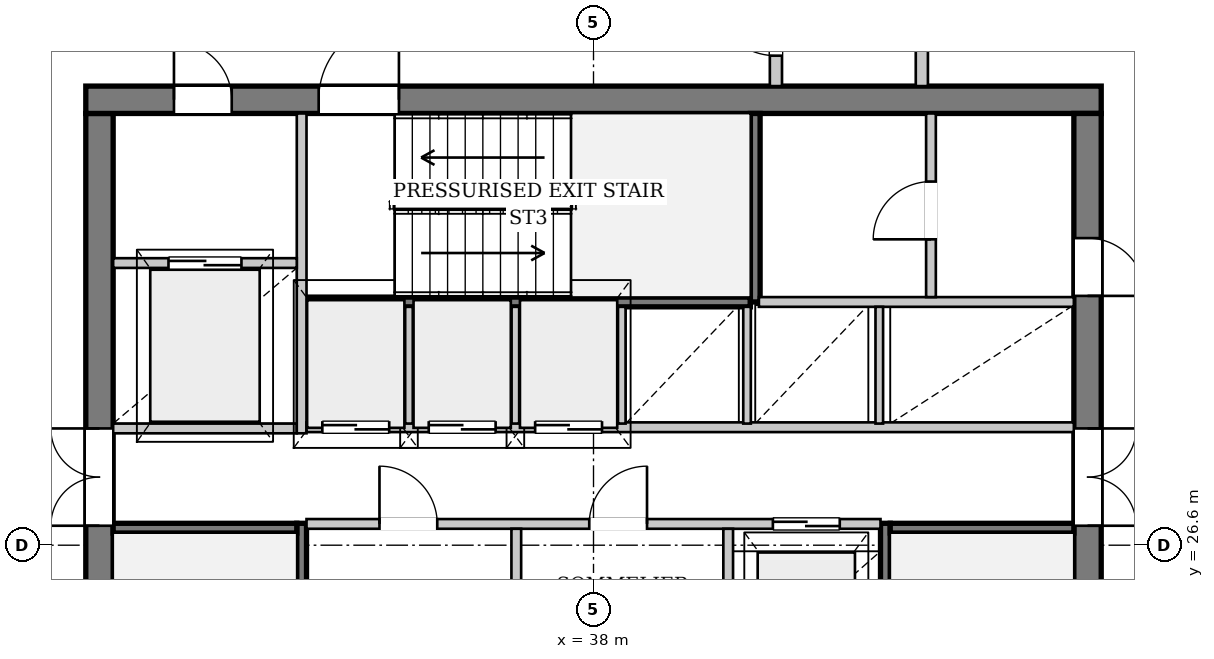
"""IFC4 building model, lengths in metres.
Left out: names, types, materials, properties, quantities, classifications, styles, units other than length and angle.
Written with IfcOpenShell. Run it as: python <this file> out.ifc"""

import sys

from ifc_helpers import new_model, si_unit, direction, frame, frame_2d, origin, place, context, subcontext, project, spatial, rectangle, extrude, source, transform, mapped, element, fill, save


model = new_model("IFC4")
c1 = context("Model", 3, precision=1e-05, world=origin(), true_north=direction((0.0, 1.0)))
c2 = subcontext(c1, "Body", "Model", "MODEL_VIEW")
j1 = project(units=[si_unit("LENGTHUNIT", "METRE"), si_unit("PLANEANGLEUNIT", "RADIAN")], contexts=[c1])
p1 = place(None, origin())
s1 = spatial("IfcSite", under=j1, at=p1, CompositionType="ELEMENT")
p2 = place(p1, origin())
s2 = spatial("IfcBuilding", under=s1, at=p2, CompositionType="ELEMENT")
p3 = place(p2, frame((0.0, 0.0, 259.7)))
s3 = spatial("IfcBuildingStorey", under=s2, at=p3, CompositionType="ELEMENT", Elevation=259.7)
p4 = place(p3, frame((51.72, 26.618, 0.0), z_axis=(0.0, 0.0, 1.0), x_axis=(-0.270053350252, -0.962845360386, 0.0)))
e1 = element("IfcWall", 1, at=p4, inside=s3, PredefinedType="SOLIDWALL", context=c2, shape_type="SweptSolid", body=[
    extrude(rectangle(XDim=22.391, YDim=0.32, at=frame_2d((11.195, 0.0))), origin(), (0.0, 0.0, 1.0), 2.872),
])
p5 = place(p4, frame((6.415, 0.0, 0.0)))
e2 = element("IfcOpeningElement", 2, at=p5, cuts=e1, PredefinedType="OPENING", context=c2, shape_type="SweptSolid", body=[
    extrude(rectangle(XDim=1.5, YDim=2.3, at=frame_2d((0.75, 1.15))), frame((0.0, 0.17, 0.0), z_axis=(0.0, -1.0, 0.0), x_axis=(1.0, 0.0, 0.0)), (0.0, 0.0, 1.0), 0.34),
])
p6 = place(p4, frame((15.269, 0.0, 0.402)))
e3 = element("IfcOpeningElement", 3, at=p6, cuts=e1, PredefinedType="OPENING", context=c2, shape_type="SweptSolid", body=[
    extrude(rectangle(XDim=2.6, YDim=2.35, at=frame_2d((1.3, 1.175))), frame((0.0, 0.17, 0.0), z_axis=(0.0, -1.0, 0.0), x_axis=(1.0, 0.0, 0.0)), (0.0, 0.0, 1.0), 0.34),
])
p7 = place(p3, frame((15.819, 27.087, 0.0), z_axis=(0.0, 0.0, 1.0), x_axis=(0.810286001924, 0.586034636421, 0.0)))
e4 = element("IfcWall", 4, at=p7, inside=s3, PredefinedType="SOLIDWALL", context=c2, shape_type="SweptSolid", body=[
    extrude(rectangle(XDim=21.866, YDim=0.38, at=frame_2d((10.933, 0.0))), origin(), (0.0, 0.0, 1.0), 2.872),
])
p8 = place(p7, frame((5.023, 0.0, 0.502)))
e5 = element("IfcOpeningElement", 5, at=p8, cuts=e4, PredefinedType="OPENING", context=c2, shape_type="SweptSolid", body=[
    extrude(rectangle(XDim=2.2, YDim=2.25, at=frame_2d((1.1, 1.125))), frame((0.0, 0.2, 0.0), z_axis=(0.0, -1.0, 0.0), x_axis=(1.0, 0.0, 0.0)), (0.0, 0.0, 1.0), 0.4),
])
p9 = place(p7, frame((16.244, 0.0, 0.502)))
e6 = element("IfcOpeningElement", 6, at=p9, cuts=e4, PredefinedType="OPENING", context=c2, shape_type="SweptSolid", body=[
    extrude(rectangle(XDim=2.2, YDim=2.25, at=frame_2d((1.1, 1.125))), frame((0.0, 0.2, 0.0), z_axis=(0.0, -1.0, 0.0), x_axis=(1.0, 0.0, 0.0)), (0.0, 0.0, 1.0), 0.4),
])
p10 = place(p3, frame((29.875, 19.5, 0.0), z_axis=(0.0, 0.0, 1.0), x_axis=(0.0, 1.0, 0.0)))
e7 = element("IfcWall", 7, at=p10, inside=s3, PredefinedType="SHEAR", context=c2, shape_type="SweptSolid", body=[
    extrude(rectangle(XDim=14.2, YDim=0.45, at=frame_2d((7.1, 0.0))), origin(), (0.0, 0.0, 1.0), 3.38),
])
p11 = place(p10, frame((7.42, 0.0, 0.0)))
e8 = element("IfcOpeningElement", 8, at=p11, cuts=e7, PredefinedType="OPENING", context=c2, shape_type="SweptSolid", body=[
    extrude(rectangle(XDim=1.6, YDim=2.2, at=frame_2d((0.8, 1.1))), frame((0.0, 0.235, 0.0), z_axis=(0.0, -1.0, 0.0), x_axis=(1.0, 0.0, 0.0)), (0.0, 0.0, 1.0), 0.47),
])
p12 = place(p3, frame((29.65, 33.925, 0.0), z_axis=(0.0, 0.0, 1.0), x_axis=(1.0, 0.0, 0.0)))
e9 = element("IfcWall", 9, at=p12, inside=s3, PredefinedType="SHEAR", context=c2, shape_type="SweptSolid", body=[
    extrude(rectangle(XDim=16.7, YDim=0.45, at=frame_2d((8.35, 0.0))), origin(), (0.0, 0.0, 1.0), 3.38),
])
p13 = place(p12, frame((1.45, 0.0, 0.0)))
e10 = element("IfcOpeningElement", 10, at=p13, cuts=e9, PredefinedType="OPENING", context=c2, shape_type="SweptSolid", body=[
    extrude(rectangle(XDim=0.95, YDim=2.1, at=frame_2d((0.475, 1.05))), frame((0.0, 0.235, 0.0), z_axis=(0.0, -1.0, 0.0), x_axis=(1.0, 0.0, 0.0)), (0.0, 0.0, 1.0), 0.47),
])
p14 = place(p12, frame((3.83, 0.0, 0.0)))
e11 = element("IfcOpeningElement", 11, at=p14, cuts=e9, PredefinedType="OPENING", context=c2, shape_type="SweptSolid", body=[
    extrude(rectangle(XDim=1.32, YDim=2.2, at=frame_2d((0.66, 1.1))), frame((0.0, 0.235, 0.0), z_axis=(0.0, -1.0, 0.0), x_axis=(1.0, 0.0, 0.0)), (0.0, 0.0, 1.0), 0.47),
])
p15 = place(p3, frame((46.125, 33.7, 0.0), z_axis=(0.0, 0.0, 1.0), x_axis=(0.0, -1.0, 0.0)))
e12 = element("IfcWall", 12, at=p15, inside=s3, PredefinedType="SHEAR", context=c2, shape_type="SweptSolid", body=[
    extrude(rectangle(XDim=14.2, YDim=0.45, at=frame_2d((7.1, 0.0))), origin(), (0.0, 0.0, 1.0), 3.38),
])
p16 = place(p15, frame((5.18, 0.0, 0.0)))
e13 = element("IfcOpeningElement", 13, at=p16, cuts=e12, PredefinedType="OPENING", context=c2, shape_type="SweptSolid", body=[
    extrude(rectangle(XDim=1.6, YDim=2.2, at=frame_2d((0.8, 1.1))), frame((0.0, 0.235, 0.0), z_axis=(0.0, -1.0, 0.0), x_axis=(1.0, 0.0, 0.0)), (0.0, 0.0, 1.0), 0.47),
])
p17 = place(p15, frame((2.05, 0.0, 0.0)))
e14 = element("IfcOpeningElement", 14, at=p17, cuts=e12, PredefinedType="OPENING", context=c2, shape_type="SweptSolid", body=[
    extrude(rectangle(XDim=0.95, YDim=2.1, at=frame_2d((0.475, 1.05))), frame((0.0, 0.235, 0.0), z_axis=(0.0, -1.0, 0.0), x_axis=(1.0, 0.0, 0.0)), (0.0, 0.0, 1.0), 0.47),
])
p18 = place(p3, frame((33.2, 19.5, 0.0), z_axis=(0.0, 0.0, 1.0), x_axis=(0.0, 1.0, 0.0)))
e15 = element("IfcWall", 15, at=p18, inside=s3, PredefinedType="PARTITIONING", context=c2, shape_type="SweptSolid", body=[
    extrude(rectangle(XDim=7.46, YDim=0.16, at=frame_2d((3.73, 0.0))), origin(), (0.0, 0.0, 1.0), 3.38),
])
p19 = place(p18, frame((0.08, 0.0, 0.0)))
e16 = element("IfcOpeningElement", 16, at=p19, cuts=e15, PredefinedType="OPENING", context=c2, shape_type="SweptSolid", body=[
    extrude(rectangle(XDim=1.32, YDim=2.2, at=frame_2d((0.66, 1.1))), frame((0.0, 0.09, 0.0), z_axis=(0.0, -1.0, 0.0), x_axis=(1.0, 0.0, 0.0)), (0.0, 0.0, 1.0), 0.18),
])
p20 = place(p3, frame((30.1, 26.88, 0.0), z_axis=(0.0, 0.0, 1.0), x_axis=(1.0, 0.0, 0.0)))
e17 = element("IfcWall", 17, at=p20, inside=s3, PredefinedType="PARTITIONING", context=c2, shape_type="SweptSolid", body=[
    extrude(rectangle(XDim=3.02, YDim=0.16, at=frame_2d((1.51, 0.0))), origin(), (0.0, 0.0, 1.0), 3.38),
])
p21 = place(p3, frame((42.8, 26.96, 0.0), z_axis=(0.0, 0.0, 1.0), x_axis=(0.0, -1.0, 0.0)))
e18 = element("IfcWall", 18, at=p21, inside=s3, PredefinedType="PARTITIONING", context=c2, shape_type="SweptSolid", body=[
    extrude(rectangle(XDim=7.46, YDim=0.16, at=frame_2d((3.73, 0.0))), origin(), (0.0, 0.0, 1.0), 3.38),
])
p22 = place(p21, frame((6.06, 0.0, 0.0)))
e19 = element("IfcOpeningElement", 19, at=p22, cuts=e18, PredefinedType="OPENING", context=c2, shape_type="SweptSolid", body=[
    extrude(rectangle(XDim=1.32, YDim=2.2, at=frame_2d((0.66, 1.1))), frame((0.0, 0.09, 0.0), z_axis=(0.0, -1.0, 0.0), x_axis=(1.0, 0.0, 0.0)), (0.0, 0.0, 1.0), 0.18),
])
p23 = place(p3, frame((42.88, 26.88, 0.0), z_axis=(0.0, 0.0, 1.0), x_axis=(1.0, 0.0, 0.0)))
e20 = element("IfcWall", 20, at=p23, inside=s3, PredefinedType="PARTITIONING", context=c2, shape_type="SweptSolid", body=[
    extrude(rectangle(XDim=3.02, YDim=0.16, at=frame_2d((1.51, 0.0))), origin(), (0.0, 0.0, 1.0), 3.38),
])
p24 = place(p3, frame((33.28, 30.6, 0.0), z_axis=(0.0, 0.0, 1.0), x_axis=(1.0, 0.0, 0.0)))
e21 = element("IfcWall", 21, at=p24, inside=s3, PredefinedType="PARTITIONING", context=c2, shape_type="SweptSolid", body=[
    extrude(rectangle(XDim=7.3, YDim=0.16, at=frame_2d((3.65, 0.0))), origin(), (0.0, 0.0, 1.0), 3.38),
])
p25 = place(p3, frame((40.66, 30.6, 0.0), z_axis=(0.0, 0.0, 1.0), x_axis=(0.0, 1.0, 0.0)))
e22 = element("IfcWall", 22, at=p25, inside=s3, PredefinedType="PARTITIONING", context=c2, shape_type="SweptSolid", body=[
    extrude(rectangle(XDim=3.1, YDim=0.16, at=frame_2d((1.55, 0.0))), origin(), (0.0, 0.0, 1.0), 3.38),
])
p26 = place(p3, frame((30.1, 28.52, 0.0), z_axis=(0.0, 0.0, 1.0), x_axis=(1.0, 0.0, 0.0)))
e23 = element("IfcWall", 23, at=p26, inside=s3, PredefinedType="PARTITIONING", context=c2, shape_type="SweptSolid", body=[
    extrude(rectangle(XDim=3.02, YDim=0.16, at=frame_2d((1.51, 0.0))), origin(), (0.0, 0.0, 1.0), 3.38),
])
p27 = place(p3, frame((33.2, 28.44, 0.0), z_axis=(0.0, 0.0, 1.0), x_axis=(0.0, 1.0, 0.0)))
e24 = element("IfcWall", 24, at=p27, inside=s3, PredefinedType="PARTITIONING", context=c2, shape_type="SweptSolid", body=[
    extrude(rectangle(XDim=5.26, YDim=0.16, at=frame_2d((2.63, 0.0))), origin(), (0.0, 0.0, 1.0), 3.38),
])
p28 = place(p3, frame((30.1, 31.24, 0.0), z_axis=(0.0, 0.0, 1.0), x_axis=(1.0, 0.0, 0.0)))
e25 = element("IfcWall", 25, at=p28, inside=s3, PredefinedType="PARTITIONING", context=c2, shape_type="SweptSolid", body=[
    extrude(rectangle(XDim=3.02, YDim=0.16, at=frame_2d((1.51, 0.0))), origin(), (0.0, 0.0, 1.0), 3.38),
])
p29 = place(p28, frame((0.91, 0.0, 0.0)))
e26 = element("IfcOpeningElement", 26, at=p29, cuts=e25, PredefinedType="OPENING", context=c2, shape_type="SweptSolid", body=[
    extrude(rectangle(XDim=1.2, YDim=2.2, at=frame_2d((0.6, 1.1))), frame((0.0, 0.09, 0.0), z_axis=(0.0, -1.0, 0.0), x_axis=(1.0, 0.0, 0.0)), (0.0, 0.0, 1.0), 0.18),
])
p30 = place(p3, frame((33.28, 26.95, 0.0), z_axis=(0.0, 0.0, 1.0), x_axis=(1.0, 0.0, 0.0)))
e27 = element("IfcWall", 27, at=p30, inside=s3, PredefinedType="PARTITIONING", context=c2, shape_type="SweptSolid", body=[
    extrude(rectangle(XDim=9.44, YDim=0.16, at=frame_2d((4.72, 0.0))), origin(), (0.0, 0.0, 1.0), 3.38),
])
p31 = place(p30, frame((1.2, 0.0, 0.0)))
e28 = element("IfcOpeningElement", 28, at=p31, cuts=e27, PredefinedType="OPENING", context=c2, shape_type="SweptSolid", body=[
    extrude(rectangle(XDim=0.95, YDim=2.1, at=frame_2d((0.475, 1.05))), frame((0.0, 0.09, 0.0), z_axis=(0.0, -1.0, 0.0), x_axis=(1.0, 0.0, 0.0)), (0.0, 0.0, 1.0), 0.18),
])
p32 = place(p30, frame((4.65, 0.0, 0.0)))
e29 = element("IfcOpeningElement", 29, at=p32, cuts=e27, PredefinedType="OPENING", context=c2, shape_type="SweptSolid", body=[
    extrude(rectangle(XDim=0.95, YDim=2.1, at=frame_2d((0.475, 1.05))), frame((0.0, 0.09, 0.0), z_axis=(0.0, -1.0, 0.0), x_axis=(1.0, 0.0, 0.0)), (0.0, 0.0, 1.0), 0.18),
])
p33 = place(p30, frame((7.67, 0.0, 0.0)))
e30 = element("IfcOpeningElement", 30, at=p33, cuts=e27, PredefinedType="OPENING", context=c2, shape_type="SweptSolid", body=[
    extrude(rectangle(XDim=1.1, YDim=2.2, at=frame_2d((0.55, 1.1))), frame((0.0, 0.09, 0.0), z_axis=(0.0, -1.0, 0.0), x_axis=(1.0, 0.0, 0.0)), (0.0, 0.0, 1.0), 0.18),
])
for number, where, z_axis, x_axis in (
    (31, (36.73, 24.56, 0.0), (0.0, 0.0, 1.0), (0.0, 1.0, 0.0)),
    (32, (40.215, 24.56, 0.0), (0.0, 0.0, 1.0), (0.0, 1.0, 0.0)),
):
    element("IfcWall", number, at=place(p3, frame(where, z_axis=z_axis, x_axis=x_axis)), inside=s3, PredefinedType="PARTITIONING", context=c2, shape_type="SweptSolid", body=[
        extrude(rectangle(XDim=2.31, YDim=0.16, at=frame_2d((1.155, 0.0))), origin(), (0.0, 0.0, 1.0), 3.38),
    ])
p34 = place(p3, frame((33.28, 28.54, 0.0), z_axis=(0.0, 0.0, 1.0), x_axis=(1.0, 0.0, 0.0)))
e33 = element("IfcWall", 33, at=p34, inside=s3, PredefinedType="PARTITIONING", context=c2, shape_type="SweptSolid", body=[
    extrude(rectangle(XDim=12.62, YDim=0.16, at=frame_2d((6.31, 0.0))), origin(), (0.0, 0.0, 1.0), 3.38),
])
p35 = place(p34, frame((0.26, 0.0, 0.0)))
e34 = element("IfcOpeningElement", 34, at=p35, cuts=e33, PredefinedType="OPENING", context=c2, shape_type="SweptSolid", body=[
    extrude(rectangle(XDim=1.1, YDim=2.2, at=frame_2d((0.55, 1.1))), frame((0.0, 0.09, 0.0), z_axis=(0.0, -1.0, 0.0), x_axis=(1.0, 0.0, 0.0)), (0.0, 0.0, 1.0), 0.18),
])
p36 = place(p34, frame((2.01, 0.0, 0.0)))
e35 = element("IfcOpeningElement", 35, at=p36, cuts=e33, PredefinedType="OPENING", context=c2, shape_type="SweptSolid", body=[
    extrude(rectangle(XDim=1.1, YDim=2.2, at=frame_2d((0.55, 1.1))), frame((0.0, 0.09, 0.0), z_axis=(0.0, -1.0, 0.0), x_axis=(1.0, 0.0, 0.0)), (0.0, 0.0, 1.0), 0.18),
])
p37 = place(p34, frame((3.76, 0.0, 0.0)))
e36 = element("IfcOpeningElement", 36, at=p37, cuts=e33, PredefinedType="OPENING", context=c2, shape_type="SweptSolid", body=[
    extrude(rectangle(XDim=1.1, YDim=2.2, at=frame_2d((0.55, 1.1))), frame((0.0, 0.09, 0.0), z_axis=(0.0, -1.0, 0.0), x_axis=(1.0, 0.0, 0.0)), (0.0, 0.0, 1.0), 0.18),
])
p38 = place(p3, frame((40.72, 30.6, 0.0), z_axis=(0.0, 0.0, 1.0), x_axis=(1.0, 0.0, 0.0)))
e37 = element("IfcWall", 37, at=p38, inside=s3, PredefinedType="PARTITIONING", context=c2, shape_type="SweptSolid", body=[
    extrude(rectangle(XDim=5.18, YDim=0.16, at=frame_2d((2.59, 0.0))), origin(), (0.0, 0.0, 1.0), 3.38),
])
for number, where, z_axis, x_axis in (
    (38, (34.965, 28.6, 0.0), (0.0, 0.0, 1.0), (0.0, 1.0, 0.0)),
    (39, (36.715, 28.6, 0.0), (0.0, 0.0, 1.0), (0.0, 1.0, 0.0)),
    (40, (38.465, 28.6, 0.0), (0.0, 0.0, 1.0), (0.0, 1.0, 0.0)),
    (41, (40.525, 28.6, 0.0), (0.0, 0.0, 1.0), (0.0, 1.0, 0.0)),
    (42, (42.7, 28.6, 0.0), (0.0, 0.0, 1.0), (0.0, 1.0, 0.0)),
):
    element("IfcWall", number, at=place(p3, frame(where, z_axis=z_axis, x_axis=x_axis)), inside=s3, PredefinedType="PARTITIONING", context=c2, shape_type="SweptSolid", body=[
        extrude(rectangle(XDim=1.92, YDim=0.125, at=frame_2d((0.96, 0.0))), origin(), (0.0, 0.0, 1.0), 3.38),
    ])
p39 = place(p3, frame((43.55, 30.68, 0.0), z_axis=(0.0, 0.0, 1.0), x_axis=(0.0, 1.0, 0.0)))
e43 = element("IfcWall", 43, at=p39, inside=s3, PredefinedType="PARTITIONING", context=c2, shape_type="SweptSolid", body=[
    extrude(rectangle(XDim=3.02, YDim=0.16, at=frame_2d((1.51, 0.0))), origin(), (0.0, 0.0, 1.0), 3.38),
])
p40 = place(p39, frame((0.95, 0.0, 0.0)))
e44 = element("IfcOpeningElement", 44, at=p40, cuts=e43, PredefinedType="OPENING", context=c2, shape_type="SweptSolid", body=[
    extrude(rectangle(XDim=0.95, YDim=2.1, at=frame_2d((0.475, 1.05))), frame((0.0, 0.09, 0.0), z_axis=(0.0, -1.0, 0.0), x_axis=(1.0, 0.0, 0.0)), (0.0, 0.0, 1.0), 0.18),
])
p41 = place(p3, frame((41.0, 34.15, 0.0), z_axis=(0.0, 0.0, 1.0), x_axis=(0.0, 1.0, 0.0)))
e45 = element("IfcWall", 45, at=p41, inside=s3, PredefinedType="PARTITIONING", context=c2, shape_type="SweptSolid", body=[
    extrude(rectangle(XDim=1.85, YDim=0.2, at=frame_2d((0.925, 0.0))), origin(), (0.0, 0.0, 1.0), 3.38),
])
p42 = place(p41, frame((0.5, 0.0, 0.0)))
e46 = element("IfcOpeningElement", 46, at=p42, cuts=e45, PredefinedType="OPENING", context=c2, shape_type="SweptSolid", body=[
    extrude(rectangle(XDim=1.05, YDim=2.2, at=frame_2d((0.525, 1.1))), frame((0.0, 0.11, 0.0), z_axis=(0.0, -1.0, 0.0), x_axis=(1.0, 0.0, 0.0)), (0.0, 0.0, 1.0), 0.22),
])
p43 = place(p3, frame((43.4, 34.15, 0.0), z_axis=(0.0, 0.0, 1.0), x_axis=(0.0, 1.0, 0.0)))
e47 = element("IfcWall", 47, at=p43, inside=s3, PredefinedType="PARTITIONING", context=c2, shape_type="SweptSolid", body=[
    extrude(rectangle(XDim=1.85, YDim=0.2, at=frame_2d((0.925, 0.0))), origin(), (0.0, 0.0, 1.0), 3.055),
])
m1 = source(origin(), c2, "Body", "SweptSolid", [
    extrude(rectangle(XDim=1.6, YDim=2.2, at=frame_2d((0.8, 1.1))), frame((0.0, 0.025, 0.0), z_axis=(0.0, -1.0, 0.0), x_axis=(1.0, 0.0, 0.0)), (0.0, 0.0, 1.0), 0.05),
])
p44 = place(p11, origin())
e48 = element("IfcDoor", 48, at=p44, inside=s3, OperationType="DOUBLE_DOOR_SINGLE_SWING", PredefinedType="DOOR", context=c2, shape_type="MappedRepresentation", body=[
    mapped(m1, transform((0.0, 0.0, 0.0), x_axis=(1.0, 0.0, 0.0), y_axis=(0.0, 1.0, 0.0), z_axis=(0.0, 0.0, 1.0), scale=1.0)),
])
fill(e8, e48)
m2 = source(origin(), c2, "Body", "SweptSolid", [
    extrude(rectangle(XDim=0.95, YDim=2.1, at=frame_2d((0.475, 1.05))), frame((0.0, 0.025, 0.0), z_axis=(0.0, -1.0, 0.0), x_axis=(1.0, 0.0, 0.0)), (0.0, 0.0, 1.0), 0.05),
])
p45 = place(p13, origin())
e49 = element("IfcDoor", 49, at=p45, inside=s3, OperationType="SINGLE_SWING_LEFT", PredefinedType="DOOR", context=c2, shape_type="MappedRepresentation", body=[
    mapped(m2, transform((0.0, 0.0, 0.0), x_axis=(1.0, 0.0, 0.0), y_axis=(0.0, 1.0, 0.0), z_axis=(0.0, 0.0, 1.0), scale=1.0)),
])
fill(e10, e49)
m3 = source(origin(), c2, "Body", "SweptSolid", [
    extrude(rectangle(XDim=1.32, YDim=2.2, at=frame_2d((0.66, 1.1))), frame((0.0, 0.025, 0.0), z_axis=(0.0, -1.0, 0.0), x_axis=(1.0, 0.0, 0.0)), (0.0, 0.0, 1.0), 0.05),
])
p46 = place(p14, origin())
e50 = element("IfcDoor", 50, at=p46, inside=s3, OperationType="SINGLE_SWING_RIGHT", PredefinedType="DOOR", context=c2, shape_type="MappedRepresentation", body=[
    mapped(m3, transform((0.0, 0.0, 0.0), x_axis=(1.0, 0.0, 0.0), y_axis=(0.0, 1.0, 0.0), z_axis=(0.0, 0.0, 1.0), scale=1.0)),
])
fill(e11, e50)
p47 = place(p16, origin())
e51 = element("IfcDoor", 51, at=p47, inside=s3, OperationType="DOUBLE_DOOR_SINGLE_SWING", PredefinedType="DOOR", context=c2, shape_type="MappedRepresentation", body=[
    mapped(m1, transform((0.0, 0.0, 0.0), x_axis=(1.0, 0.0, 0.0), y_axis=(0.0, 1.0, 0.0), z_axis=(0.0, 0.0, 1.0), scale=1.0)),
])
fill(e13, e51)
m4 = source(origin(), c2, "Body", "SweptSolid", [
    extrude(rectangle(XDim=1.2, YDim=2.2, at=frame_2d((0.6, 1.1))), frame((0.0, 0.025, 0.0), z_axis=(0.0, -1.0, 0.0), x_axis=(1.0, 0.0, 0.0)), (0.0, 0.0, 1.0), 0.05),
])
p48 = place(p29, origin())
e52 = element("IfcDoor", 52, at=p48, inside=s3, OperationType="DOUBLE_DOOR_SLIDING", PredefinedType="DOOR", context=c2, shape_type="MappedRepresentation", body=[
    mapped(m4, transform((0.0, 0.0, 0.0), x_axis=(1.0, 0.0, 0.0), y_axis=(0.0, 1.0, 0.0), z_axis=(0.0, 0.0, 1.0), scale=1.0)),
])
fill(e26, e52)
p49 = place(p31, origin())
e53 = element("IfcDoor", 53, at=p49, inside=s3, OperationType="SINGLE_SWING_LEFT", PredefinedType="DOOR", context=c2, shape_type="MappedRepresentation", body=[
    mapped(m2, transform((0.0, 0.0, 0.0), x_axis=(1.0, 0.0, 0.0), y_axis=(0.0, 1.0, 0.0), z_axis=(0.0, 0.0, 1.0), scale=1.0)),
])
fill(e28, e53)
p50 = place(p32, origin())
e54 = element("IfcDoor", 54, at=p50, inside=s3, OperationType="SINGLE_SWING_RIGHT", PredefinedType="DOOR", context=c2, shape_type="MappedRepresentation", body=[
    mapped(m2, transform((0.0, 0.0, 0.0), x_axis=(1.0, 0.0, 0.0), y_axis=(0.0, 1.0, 0.0), z_axis=(0.0, 0.0, 1.0), scale=1.0)),
])
fill(e29, e54)
m5 = source(origin(), c2, "Body", "SweptSolid", [
    extrude(rectangle(XDim=1.1, YDim=2.2, at=frame_2d((0.55, 1.1))), frame((0.0, 0.025, 0.0), z_axis=(0.0, -1.0, 0.0), x_axis=(1.0, 0.0, 0.0)), (0.0, 0.0, 1.0), 0.05),
])
p51 = place(p33, origin())
e55 = element("IfcDoor", 55, at=p51, inside=s3, OperationType="DOUBLE_DOOR_SLIDING", PredefinedType="DOOR", context=c2, shape_type="MappedRepresentation", body=[
    mapped(m5, transform((0.0, 0.0, 0.0), x_axis=(1.0, 0.0, 0.0), y_axis=(0.0, 1.0, 0.0), z_axis=(0.0, 0.0, 1.0), scale=1.0)),
])
fill(e30, e55)
p52 = place(p35, origin())
e56 = element("IfcDoor", 56, at=p52, inside=s3, OperationType="DOUBLE_DOOR_SLIDING", PredefinedType="DOOR", context=c2, shape_type="MappedRepresentation", body=[
    mapped(m5, transform((0.0, 0.0, 0.0), x_axis=(1.0, 0.0, 0.0), y_axis=(0.0, 1.0, 0.0), z_axis=(0.0, 0.0, 1.0), scale=1.0)),
])
fill(e34, e56)
p53 = place(p36, origin())
e57 = element("IfcDoor", 57, at=p53, inside=s3, OperationType="DOUBLE_DOOR_SLIDING", PredefinedType="DOOR", context=c2, shape_type="MappedRepresentation", body=[
    mapped(m5, transform((0.0, 0.0, 0.0), x_axis=(1.0, 0.0, 0.0), y_axis=(0.0, 1.0, 0.0), z_axis=(0.0, 0.0, 1.0), scale=1.0)),
])
fill(e35, e57)
p54 = place(p37, origin())
e58 = element("IfcDoor", 58, at=p54, inside=s3, OperationType="DOUBLE_DOOR_SLIDING", PredefinedType="DOOR", context=c2, shape_type="MappedRepresentation", body=[
    mapped(m5, transform((0.0, 0.0, 0.0), x_axis=(1.0, 0.0, 0.0), y_axis=(0.0, 1.0, 0.0), z_axis=(0.0, 0.0, 1.0), scale=1.0)),
])
fill(e36, e58)
p55 = place(p40, origin())
e59 = element("IfcDoor", 59, at=p55, inside=s3, OperationType="SINGLE_SWING_LEFT", PredefinedType="DOOR", context=c2, shape_type="MappedRepresentation", body=[
    mapped(m2, transform((0.0, 0.0, 0.0), x_axis=(1.0, 0.0, 0.0), y_axis=(0.0, 1.0, 0.0), z_axis=(0.0, 0.0, 1.0), scale=1.0)),
])
fill(e44, e59)
p56 = place(p17, origin())
e60 = element("IfcDoor", 60, at=p56, inside=s3, OperationType="SINGLE_SWING_RIGHT", PredefinedType="DOOR", context=c2, shape_type="MappedRepresentation", body=[
    mapped(m2, transform((0.0, 0.0, 0.0), x_axis=(1.0, 0.0, 0.0), y_axis=(0.0, 1.0, 0.0), z_axis=(0.0, 0.0, 1.0), scale=1.0)),
])
fill(e14, e60)
m6 = source(origin(), c2, "Body", "SweptSolid", [
    extrude(rectangle(XDim=1.05, YDim=2.2, at=frame_2d((0.525, 1.1))), frame((0.0, 0.025, 0.0), z_axis=(0.0, -1.0, 0.0), x_axis=(1.0, 0.0, 0.0)), (0.0, 0.0, 1.0), 0.05),
])
p57 = place(p42, origin())
e61 = element("IfcDoor", 61, at=p57, inside=s3, OperationType="SINGLE_SWING_RIGHT", PredefinedType="DOOR", context=c2, shape_type="MappedRepresentation", body=[
    mapped(m6, transform((0.0, 0.0, 0.0), x_axis=(1.0, 0.0, 0.0), y_axis=(0.0, 1.0, 0.0), z_axis=(0.0, 0.0, 1.0), scale=1.0)),
])
fill(e46, e61)
save(model, sys.argv[1])
